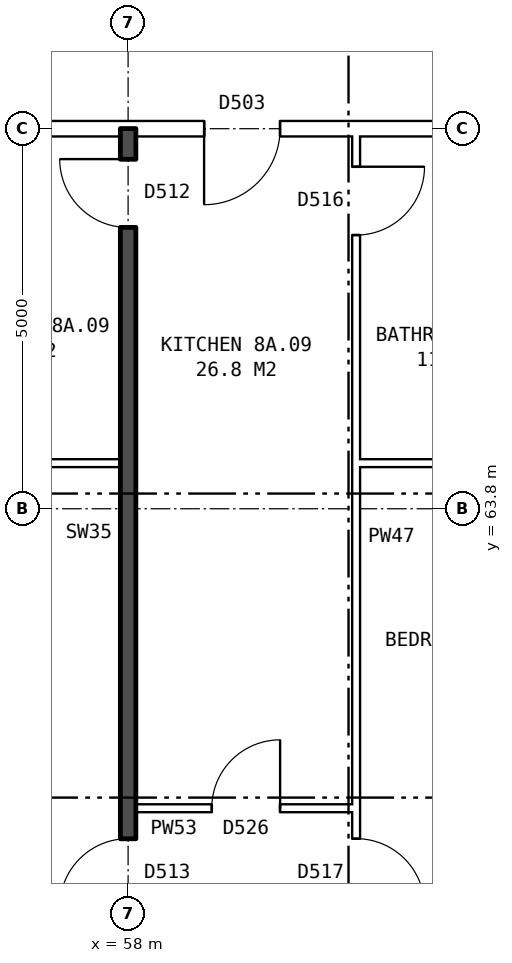
"""IFC4 building model, lengths in metres.
Left out: names, types, materials, properties, quantities, classifications, styles, units other than length and angle.
Written with IfcOpenShell. Run it as: python <this file> out.ifc"""

import sys

from ifc_helpers import new_model, si_unit, direction, frame, frame_2d, origin, place, context, subcontext, project, spatial, rectangle, extrude, element, fill, save


model = new_model("IFC4")
c1 = context("Model", 3, precision=1e-05, world=origin(), true_north=direction((0.0, 1.0)))
c2 = subcontext(c1, "Body", "Model", "MODEL_VIEW")
j1 = project(units=[si_unit("LENGTHUNIT", "METRE"), si_unit("PLANEANGLEUNIT", "RADIAN")], contexts=[c1])
p1 = place(None, origin())
s1 = spatial("IfcSite", under=j1, at=p1, CompositionType="ELEMENT")
p2 = place(p1, origin())
s2 = spatial("IfcBuilding", under=s1, at=p2, CompositionType="ELEMENT")
p3 = place(p2, frame((0.0, 0.0, 31.9)))
s3 = spatial("IfcBuildingStorey", under=s2, at=p3, CompositionType="ELEMENT", Elevation=31.9)
p4 = place(p3, frame((58.1, 59.86, 0.0), z_axis=(0.0, 0.0, 1.0), x_axis=(1.0, 0.0, 0.0)))
e1 = element("IfcWall", 1, at=p4, inside=s3, PredefinedType="PARTITIONING", context=c2, shape_type="SweptSolid", body=[
    extrude(rectangle(XDim=2.9, YDim=0.1, at=frame_2d((1.45, 0.0))), origin(), (0.0, 0.0, 1.0), 2.85),
])
p5 = place(p4, frame((1.0, 0.0, 0.0)))
e2 = element("IfcOpeningElement", 2, at=p5, cuts=e1, PredefinedType="OPENING", context=c2, shape_type="SweptSolid", body=[
    extrude(rectangle(XDim=0.9, YDim=2.1, at=frame_2d((0.45, 1.05))), frame((0.0, 0.06, 0.0), z_axis=(0.0, -1.0, 0.0), x_axis=(1.0, 0.0, 0.0)), (0.0, 0.0, 1.0), 0.12),
])
p6 = place(p3, frame((55.1, 64.4, 0.0), z_axis=(0.0, 0.0, 1.0), x_axis=(1.0, 0.0, 0.0)))
e3 = element("IfcWall", 3, at=p6, inside=s3, PredefinedType="PARTITIONING", context=c2, shape_type="SweptSolid", body=[
    extrude(rectangle(XDim=2.8, YDim=0.1, at=frame_2d((1.4, 0.0))), origin(), (0.0, 0.0, 1.0), 2.85),
])
p7 = place(p3, frame((61.0, 64.4, 0.0), z_axis=(0.0, 0.0, 1.0), x_axis=(1.0, 0.0, 0.0)))
e4 = element("IfcWall", 4, at=p7, inside=s3, PredefinedType="PARTITIONING", context=c2, shape_type="SweptSolid", body=[
    extrude(rectangle(XDim=2.64, YDim=0.1, at=frame_2d((1.32, 0.0))), origin(), (0.0, 0.0, 1.0), 2.85),
])
p8 = place(p3, frame((44.36, 68.8, 0.0), z_axis=(0.0, 0.0, 1.0), x_axis=(1.0, 0.0, 0.0)))
e5 = element("IfcWall", 5, at=p8, inside=s3, PredefinedType="PARTITIONING", context=c2, shape_type="SweptSolid", body=[
    extrude(rectangle(XDim=19.28, YDim=0.2, at=frame_2d((9.64, 0.0))), origin(), (0.0, 0.0, 1.0), 2.85),
])
p9 = place(p8, frame((14.64, 0.0, 0.0)))
e6 = element("IfcOpeningElement", 6, at=p9, cuts=e5, PredefinedType="OPENING", context=c2, shape_type="SweptSolid", body=[
    extrude(rectangle(XDim=1.0, YDim=2.1, at=frame_2d((0.5, 1.05))), frame((0.0, 0.11, 0.0), z_axis=(0.0, -1.0, 0.0), x_axis=(1.0, 0.0, 0.0)), (0.0, 0.0, 1.0), 0.22),
])
p10 = place(p8, frame((5.64, 0.0, 0.0)))
e7 = element("IfcOpeningElement", 7, at=p10, cuts=e5, PredefinedType="OPENING", context=c2, shape_type="SweptSolid", body=[
    extrude(rectangle(XDim=1.0, YDim=2.1, at=frame_2d((0.5, 1.05))), frame((0.0, 0.11, 0.0), z_axis=(0.0, -1.0, 0.0), x_axis=(1.0, 0.0, 0.0)), (0.0, 0.0, 1.0), 0.22),
])
p11 = place(p3, frame((58.0, 54.36, 0.0), z_axis=(0.0, 0.0, 1.0), x_axis=(0.0, 1.0, 0.0)))
e8 = element("IfcWall", 8, at=p11, inside=s3, PredefinedType="SOLIDWALL", context=c2, shape_type="SweptSolid", body=[
    extrude(rectangle(XDim=14.44, YDim=0.2, at=frame_2d((7.22, 0.0))), origin(), (0.0, 0.0, 1.0), 2.85),
])
p12 = place(p11, frame((4.2, 0.0, 0.0)))
e9 = element("IfcOpeningElement", 9, at=p12, cuts=e8, PredefinedType="OPENING", context=c2, shape_type="SweptSolid", body=[
    extrude(rectangle(XDim=0.9, YDim=2.1, at=frame_2d((0.45, 1.05))), frame((0.0, 0.11, 0.0), z_axis=(0.0, -1.0, 0.0), x_axis=(1.0, 0.0, 0.0)), (0.0, 0.0, 1.0), 0.22),
])
p13 = place(p11, frame((13.14, 0.0, 0.0)))
e10 = element("IfcOpeningElement", 10, at=p13, cuts=e8, PredefinedType="OPENING", context=c2, shape_type="SweptSolid", body=[
    extrude(rectangle(XDim=0.9, YDim=2.1, at=frame_2d((0.45, 1.05))), frame((0.0, 0.11, 0.0), z_axis=(0.0, -1.0, 0.0), x_axis=(1.0, 0.0, 0.0)), (0.0, 0.0, 1.0), 0.22),
])
p14 = place(p3, frame((61.0, 54.36, 0.0), z_axis=(0.0, 0.0, 1.0), x_axis=(0.0, 1.0, 0.0)))
e11 = element("IfcWall", 11, at=p14, inside=s3, PredefinedType="PARTITIONING", context=c2, shape_type="SweptSolid", body=[
    extrude(rectangle(XDim=14.34, YDim=0.1, at=frame_2d((7.17, 0.0))), origin(), (0.0, 0.0, 1.0), 2.85),
])
p15 = place(p14, frame((4.2, 0.0, 0.0)))
e12 = element("IfcOpeningElement", 12, at=p15, cuts=e11, PredefinedType="OPENING", context=c2, shape_type="SweptSolid", body=[
    extrude(rectangle(XDim=0.9, YDim=2.1, at=frame_2d((0.45, 1.05))), frame((0.0, 0.06, 0.0), z_axis=(0.0, -1.0, 0.0), x_axis=(1.0, 0.0, 0.0)), (0.0, 0.0, 1.0), 0.12),
])
p16 = place(p14, frame((13.04, 0.0, 0.0)))
e13 = element("IfcOpeningElement", 13, at=p16, cuts=e11, PredefinedType="OPENING", context=c2, shape_type="SweptSolid", body=[
    extrude(rectangle(XDim=0.9, YDim=2.1, at=frame_2d((0.45, 1.05))), frame((0.0, 0.06, 0.0), z_axis=(0.0, -1.0, 0.0), x_axis=(1.0, 0.0, 0.0)), (0.0, 0.0, 1.0), 0.12),
])
p17 = place(p15, frame((0.9, 0.0, 0.0), z_axis=(0.0, 0.0, 1.0), x_axis=(-1.0, 0.0, 0.0)))
e14 = element("IfcDoor", 14, at=p17, inside=s3, OperationType="SINGLE_SWING_RIGHT", PredefinedType="DOOR", context=c2, shape_type="SweptSolid", body=[
    extrude(rectangle(XDim=0.9, YDim=2.1, at=frame_2d((0.45, 1.05))), frame((0.0, 0.025, 0.0), z_axis=(0.0, -1.0, 0.0), x_axis=(1.0, 0.0, 0.0)), (0.0, 0.0, 1.0), 0.05),
])
fill(e12, e14)
p18 = place(p12, origin())
e15 = element("IfcDoor", 15, at=p18, inside=s3, OperationType="SINGLE_SWING_LEFT", PredefinedType="DOOR", context=c2, shape_type="SweptSolid", body=[
    extrude(rectangle(XDim=0.9, YDim=2.1, at=frame_2d((0.45, 1.05))), frame((0.0, 0.025, 0.0), z_axis=(0.0, -1.0, 0.0), x_axis=(1.0, 0.0, 0.0)), (0.0, 0.0, 1.0), 0.05),
])
fill(e9, e15)
p19 = place(p9, frame((1.0, 0.0, 0.0), z_axis=(0.0, 0.0, 1.0), x_axis=(-1.0, 0.0, 0.0)))
e16 = element("IfcDoor", 16, at=p19, inside=s3, OperationType="SINGLE_SWING_RIGHT", PredefinedType="DOOR", context=c2, shape_type="SweptSolid", body=[
    extrude(rectangle(XDim=1.0, YDim=2.1, at=frame_2d((0.5, 1.05))), frame((0.0, 0.025, 0.0), z_axis=(0.0, -1.0, 0.0), x_axis=(1.0, 0.0, 0.0)), (0.0, 0.0, 1.0), 0.05),
])
fill(e6, e16)
p20 = place(p5, origin())
e17 = element("IfcDoor", 17, at=p20, inside=s3, OperationType="SINGLE_SWING_RIGHT", PredefinedType="DOOR", context=c2, shape_type="SweptSolid", body=[
    extrude(rectangle(XDim=0.9, YDim=2.1, at=frame_2d((0.45, 1.05))), frame((0.0, 0.025, 0.0), z_axis=(0.0, -1.0, 0.0), x_axis=(1.0, 0.0, 0.0)), (0.0, 0.0, 1.0), 0.05),
])
fill(e2, e17)
p21 = place(p16, frame((0.9, 0.0, 0.0), z_axis=(0.0, 0.0, 1.0), x_axis=(-1.0, 0.0, 0.0)))
e18 = element("IfcDoor", 18, at=p21, inside=s3, OperationType="SINGLE_SWING_LEFT", PredefinedType="DOOR", context=c2, shape_type="SweptSolid", body=[
    extrude(rectangle(XDim=0.9, YDim=2.1, at=frame_2d((0.45, 1.05))), frame((0.0, 0.025, 0.0), z_axis=(0.0, -1.0, 0.0), x_axis=(1.0, 0.0, 0.0)), (0.0, 0.0, 1.0), 0.05),
])
fill(e13, e18)
p22 = place(p13, origin())
e19 = element("IfcDoor", 19, at=p22, inside=s3, OperationType="SINGLE_SWING_RIGHT", PredefinedType="DOOR", context=c2, shape_type="SweptSolid", body=[
    extrude(rectangle(XDim=0.9, YDim=2.1, at=frame_2d((0.45, 1.05))), frame((0.0, 0.025, 0.0), z_axis=(0.0, -1.0, 0.0), x_axis=(1.0, 0.0, 0.0)), (0.0, 0.0, 1.0), 0.05),
])
fill(e10, e19)
save(model, sys.argv[1])
